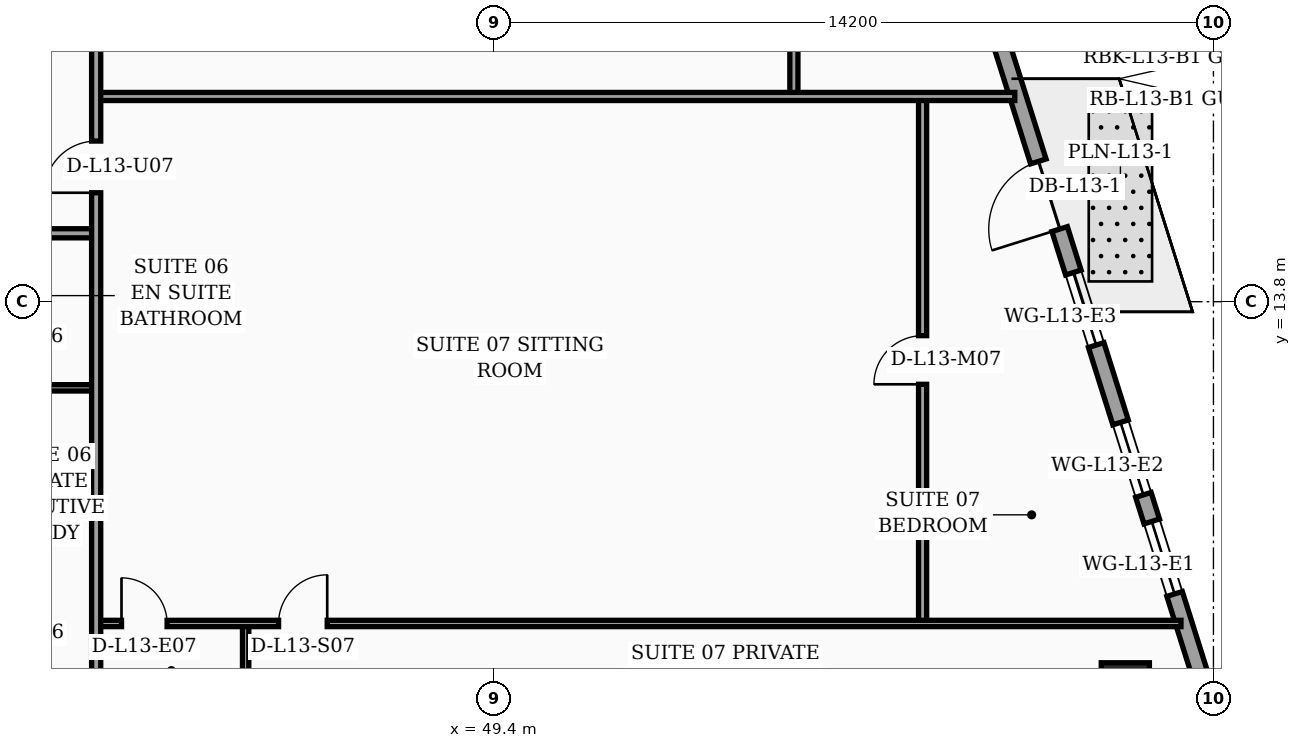
"""IFC4 building model, lengths in metres.
Left out: names, types, materials, properties, quantities, classifications, styles, units other than length and angle.
Written with IfcOpenShell. Run it as: python <this file> out.ifc"""

import sys

from ifc_helpers import new_model, si_unit, direction, frame, frame_2d, origin, origin_2d, place, context, subcontext, project, spatial, rectangle, hollow_rectangle, extrude, element, fill, save


model = new_model("IFC4")
c1 = context("Model", 3, precision=1e-05, world=origin(), true_north=direction((0.0, 1.0)))
c2 = subcontext(c1, "Body", "Model", "MODEL_VIEW")
j1 = project(units=[si_unit("LENGTHUNIT", "METRE"), si_unit("PLANEANGLEUNIT", "RADIAN")], contexts=[c1])
p1 = place(None, origin())
s1 = spatial("IfcSite", under=j1, at=p1, CompositionType="ELEMENT")
p2 = place(p1, origin())
s2 = spatial("IfcBuilding", under=s1, at=p2, CompositionType="ELEMENT")
p3 = place(p2, frame((0.0, 0.0, 58.4)))
s3 = spatial("IfcBuildingStorey", under=s2, at=p3, CompositionType="ELEMENT", Elevation=58.4)
p4 = place(p3, frame((61.861, 6.2, 0.0), z_axis=(0.0, 0.0, 1.0), x_axis=(1.0, 0.0, 0.0)))
e1 = element("IfcColumn", 1, at=p4, inside=s3, PredefinedType="COLUMN", context=c2, shape_type="SweptSolid", body=[
    extrude(hollow_rectangle(XDim=0.95, YDim=0.95, WallThickness=0.04, at=origin_2d()), origin(), (0.0, 0.0, 1.0), 3.56),
])
p5 = place(p3, frame((63.63, 5.505, 0.0), z_axis=(0.0, 0.0, 1.0), x_axis=(-0.300501856448, 0.953781229775, 0.0)))
e2 = element("IfcWall", 2, at=p5, inside=s3, PredefinedType="SOLIDWALL", context=c2, shape_type="SweptSolid", body=[
    extrude(rectangle(XDim=30.814, YDim=0.32, at=frame_2d((15.407, 0.0))), origin(), (0.0, 0.0, 1.0), 3.56),
])
p6 = place(p5, frame((10.199, 0.0, 0.0)))
e3 = element("IfcOpeningElement", 3, at=p6, cuts=e2, PredefinedType="OPENING", context=c2, shape_type="SweptSolid", body=[
    extrude(rectangle(XDim=1.4, YDim=2.25, at=frame_2d((0.7, 1.125))), frame((0.0, 0.17, 0.0), z_axis=(0.0, -1.0, 0.0), x_axis=(1.0, 0.0, 0.0)), (0.0, 0.0, 1.0), 0.34),
])
p7 = place(p5, frame((2.65, 0.0, 0.75)))
e4 = element("IfcOpeningElement", 4, at=p7, cuts=e2, PredefinedType="OPENING", context=c2, shape_type="SweptSolid", body=[
    extrude(rectangle(XDim=1.5, YDim=1.6, at=frame_2d((0.75, 0.8))), frame((0.0, 0.17, 0.0), z_axis=(0.0, -1.0, 0.0), x_axis=(1.0, 0.0, 0.0)), (0.0, 0.0, 1.0), 0.34),
])
p8 = place(p5, frame((4.7, 0.0, 0.75)))
e5 = element("IfcOpeningElement", 5, at=p8, cuts=e2, PredefinedType="OPENING", context=c2, shape_type="SweptSolid", body=[
    extrude(rectangle(XDim=1.5, YDim=1.6, at=frame_2d((0.75, 0.8))), frame((0.0, 0.17, 0.0), z_axis=(0.0, -1.0, 0.0), x_axis=(1.0, 0.0, 0.0)), (0.0, 0.0, 1.0), 0.34),
])
p9 = place(p5, frame((7.8, 0.0, 0.75)))
e6 = element("IfcOpeningElement", 6, at=p9, cuts=e2, PredefinedType="OPENING", context=c2, shape_type="SweptSolid", body=[
    extrude(rectangle(XDim=1.5, YDim=1.6, at=frame_2d((0.75, 0.8))), frame((0.0, 0.17, 0.0), z_axis=(0.0, -1.0, 0.0), x_axis=(1.0, 0.0, 0.0)), (0.0, 0.0, 1.0), 0.34),
])
p10 = place(p5, frame((14.0, 0.0, 0.75)))
e7 = element("IfcOpeningElement", 7, at=p10, cuts=e2, PredefinedType="OPENING", context=c2, shape_type="SweptSolid", body=[
    extrude(rectangle(XDim=1.5, YDim=1.6, at=frame_2d((0.75, 0.8))), frame((0.0, 0.17, 0.0), z_axis=(0.0, -1.0, 0.0), x_axis=(1.0, 0.0, 0.0)), (0.0, 0.0, 1.0), 0.34),
])
p11 = place(p5, frame((17.1, 0.0, 0.75)))
e8 = element("IfcOpeningElement", 8, at=p11, cuts=e2, PredefinedType="OPENING", context=c2, shape_type="SweptSolid", body=[
    extrude(rectangle(XDim=1.5, YDim=1.6, at=frame_2d((0.75, 0.8))), frame((0.0, 0.17, 0.0), z_axis=(0.0, -1.0, 0.0), x_axis=(1.0, 0.0, 0.0)), (0.0, 0.0, 1.0), 0.34),
])
p12 = place(p5, frame((23.3, 0.0, 0.75)))
e9 = element("IfcOpeningElement", 9, at=p12, cuts=e2, PredefinedType="OPENING", context=c2, shape_type="SweptSolid", body=[
    extrude(rectangle(XDim=1.5, YDim=1.6, at=frame_2d((0.75, 0.8))), frame((0.0, 0.17, 0.0), z_axis=(0.0, -1.0, 0.0), x_axis=(1.0, 0.0, 0.0)), (0.0, 0.0, 1.0), 0.34),
])
p13 = place(p5, frame((27.45, 0.0, 0.75)))
e10 = element("IfcOpeningElement", 10, at=p13, cuts=e2, PredefinedType="OPENING", context=c2, shape_type="SweptSolid", body=[
    extrude(rectangle(XDim=1.5, YDim=1.6, at=frame_2d((0.75, 0.8))), frame((0.0, 0.17, 0.0), z_axis=(0.0, -1.0, 0.0), x_axis=(1.0, 0.0, 0.0)), (0.0, 0.0, 1.0), 0.34),
])
p14 = place(p3, frame((39.42, 12.1, 0.0), z_axis=(0.0, 0.0, 1.0), x_axis=(1.0, 0.0, 0.0)))
e11 = element("IfcWall", 11, at=p14, inside=s3, PredefinedType="PARTITIONING", context=c2, shape_type="SweptSolid", body=[
    extrude(rectangle(XDim=2.13, YDim=0.125, at=frame_2d((1.065, 0.0))), origin(), (0.0, 0.0, 1.0), 3.56),
])
p15 = place(p3, frame((32.4, 15.15, 0.0), z_axis=(0.0, 0.0, 1.0), x_axis=(1.0, 0.0, 0.0)))
e12 = element("IfcWall", 12, at=p15, inside=s3, PredefinedType="PARTITIONING", context=c2, shape_type="SweptSolid", body=[
    extrude(rectangle(XDim=9.15, YDim=0.18, at=frame_2d((4.575, 0.0))), origin(), (0.0, 0.0, 1.0), 2.84),
])
p16 = place(p15, frame((3.1, 0.0, 0.0)))
e13 = element("IfcOpeningElement", 13, at=p16, cuts=e12, PredefinedType="OPENING", context=c2, shape_type="SweptSolid", body=[
    extrude(rectangle(XDim=1.02, YDim=2.2, at=frame_2d((0.51, 1.1))), frame((0.0, 0.1, 0.0), z_axis=(0.0, -1.0, 0.0), x_axis=(1.0, 0.0, 0.0)), (0.0, 0.0, 1.0), 0.2),
])
p17 = place(p3, frame((44.5, 5.66, 0.0), z_axis=(0.0, 0.0, 1.0), x_axis=(0.0, 1.0, 0.0)))
e14 = element("IfcWall", 14, at=p17, inside=s3, PredefinedType="PARTITIONING", context=c2, shape_type="SweptSolid", body=[
    extrude(rectangle(XDim=1.79, YDim=0.125, at=frame_2d((0.895, 0.0))), origin(), (0.0, 0.0, 1.0), 3.56),
])
p18 = place(p3, frame((57.86, 7.45, 0.0), z_axis=(0.0, 0.0, 1.0), x_axis=(0.0, 1.0, 0.0)))
e15 = element("IfcWall", 15, at=p18, inside=s3, PredefinedType="PARTITIONING", context=c2, shape_type="SweptSolid", body=[
    extrude(rectangle(XDim=10.4, YDim=0.16, at=frame_2d((5.2, 0.0))), origin(), (0.0, 0.0, 1.0), 3.04),
])
p19 = place(p18, frame((4.72, 0.0, 0.0)))
e16 = element("IfcOpeningElement", 16, at=p19, cuts=e15, PredefinedType="OPENING", context=c2, shape_type="SweptSolid", body=[
    extrude(rectangle(XDim=0.96, YDim=2.2, at=frame_2d((0.48, 1.1))), frame((0.0, 0.09, 0.0), z_axis=(0.0, -1.0, 0.0), x_axis=(1.0, 0.0, 0.0)), (0.0, 0.0, 1.0), 0.18),
])
p20 = place(p3, frame((41.55, 7.45, 0.0), z_axis=(0.0, 0.0, 1.0), x_axis=(1.0, 0.0, 0.0)))
e17 = element("IfcWall", 17, at=p20, inside=s3, PredefinedType="PARTITIONING", context=c2, shape_type="SweptSolid", body=[
    extrude(rectangle(XDim=21.41, YDim=0.125, at=frame_2d((10.705, 0.0))), origin(), (0.0, 0.0, 1.0), 2.84),
])
p21 = place(p20, frame((0.5, 0.0, 0.0)))
e18 = element("IfcOpeningElement", 18, at=p21, cuts=e17, PredefinedType="OPENING", context=c2, shape_type="SweptSolid", body=[
    extrude(rectangle(XDim=0.9, YDim=2.15, at=frame_2d((0.45, 1.075))), frame((0.0, 0.073, 0.0), z_axis=(0.0, -1.0, 0.0), x_axis=(1.0, 0.0, 0.0)), (0.0, 0.0, 1.0), 0.145),
])
p22 = place(p20, frame((3.6, 0.0, 0.0)))
e19 = element("IfcOpeningElement", 19, at=p22, cuts=e17, PredefinedType="OPENING", context=c2, shape_type="SweptSolid", body=[
    extrude(rectangle(XDim=0.96, YDim=2.2, at=frame_2d((0.48, 1.1))), frame((0.0, 0.073, 0.0), z_axis=(0.0, -1.0, 0.0), x_axis=(1.0, 0.0, 0.0)), (0.0, 0.0, 1.0), 0.145),
])
p23 = place(p3, frame((55.32, 17.85, 0.0), z_axis=(0.0, 0.0, 1.0), x_axis=(0.0, 1.0, 0.0)))
e20 = element("IfcWall", 20, at=p23, inside=s3, PredefinedType="PARTITIONING", context=c2, shape_type="SweptSolid", body=[
    extrude(rectangle(XDim=5.74, YDim=0.16, at=frame_2d((2.87, 0.0))), origin(), (0.0, 0.0, 1.0), 2.84),
])
p24 = place(p23, frame((2.39, 0.0, 0.0)))
e21 = element("IfcOpeningElement", 21, at=p24, cuts=e20, PredefinedType="OPENING", context=c2, shape_type="SweptSolid", body=[
    extrude(rectangle(XDim=0.96, YDim=2.2, at=frame_2d((0.48, 1.1))), frame((0.0, 0.09, 0.0), z_axis=(0.0, -1.0, 0.0), x_axis=(1.0, 0.0, 0.0)), (0.0, 0.0, 1.0), 0.18),
])
p25 = place(p3, frame((41.55, 17.85, 0.0), z_axis=(0.0, 0.0, 1.0), x_axis=(1.0, 0.0, 0.0)))
e22 = element("IfcWall", 22, at=p25, inside=s3, PredefinedType="PARTITIONING", context=c2, shape_type="SweptSolid", body=[
    extrude(rectangle(XDim=18.13, YDim=0.16, at=frame_2d((9.065, 0.0))), origin(), (0.0, 0.0, 1.0), 2.84),
])
p26 = place(p3, frame((41.55, 2.44, 0.0), z_axis=(0.0, 0.0, 1.0), x_axis=(0.0, 1.0, 0.0)))
e23 = element("IfcWall", 23, at=p26, inside=s3, PredefinedType="PARTITIONING", context=c2, shape_type="SweptSolid", body=[
    extrude(rectangle(XDim=31.04, YDim=0.18, at=frame_2d((15.52, 0.0))), origin(), (0.0, 0.0, 1.0), 2.84),
])
p27 = place(p26, frame((13.51, 0.0, 0.0)))
e24 = element("IfcOpeningElement", 24, at=p27, cuts=e23, PredefinedType="OPENING", context=c2, shape_type="SweptSolid", body=[
    extrude(rectangle(XDim=1.02, YDim=2.2, at=frame_2d((0.51, 1.1))), frame((0.0, 0.1, 0.0), z_axis=(0.0, -1.0, 0.0), x_axis=(1.0, 0.0, 0.0)), (0.0, 0.0, 1.0), 0.2),
])
p28 = place(p26, frame((17.77, 0.0, 0.0)))
e25 = element("IfcOpeningElement", 25, at=p28, cuts=e23, PredefinedType="OPENING", context=c2, shape_type="SweptSolid", body=[
    extrude(rectangle(XDim=1.02, YDim=2.2, at=frame_2d((0.51, 1.1))), frame((0.0, 0.1, 0.0), z_axis=(0.0, -1.0, 0.0), x_axis=(1.0, 0.0, 0.0)), (0.0, 0.0, 1.0), 0.2),
])
p29 = place(p26, frame((25.58, 0.0, 0.0)))
e26 = element("IfcOpeningElement", 26, at=p29, cuts=e23, PredefinedType="OPENING", context=c2, shape_type="SweptSolid", body=[
    extrude(rectangle(XDim=1.02, YDim=2.2, at=frame_2d((0.51, 1.1))), frame((0.0, 0.1, 0.0), z_axis=(0.0, -1.0, 0.0), x_axis=(1.0, 0.0, 0.0)), (0.0, 0.0, 1.0), 0.2),
])
p30 = place(p6, origin())
e27 = element("IfcDoor", 27, at=p30, inside=s3, OperationType="SINGLE_SWING_LEFT", PredefinedType="DOOR", context=c2, shape_type="SweptSolid", body=[
    extrude(rectangle(XDim=1.4, YDim=2.25, at=frame_2d((0.7, 1.125))), frame((0.0, 0.025, 0.0), z_axis=(0.0, -1.0, 0.0), x_axis=(1.0, 0.0, 0.0)), (0.0, 0.0, 1.0), 0.05),
])
fill(e3, e27)
p31 = place(p7, origin())
e28 = element("IfcWindow", 28, at=p31, inside=s3, PartitioningType="SINGLE_PANEL", PredefinedType="WINDOW", context=c2, shape_type="SweptSolid", body=[
    extrude(rectangle(XDim=1.5, YDim=1.6, at=frame_2d((0.75, 0.8))), frame((0.0, 0.03, 0.0), z_axis=(0.0, -1.0, 0.0), x_axis=(1.0, 0.0, 0.0)), (0.0, 0.0, 1.0), 0.06),
])
fill(e4, e28)
p32 = place(p8, origin())
e29 = element("IfcWindow", 29, at=p32, inside=s3, PartitioningType="SINGLE_PANEL", PredefinedType="WINDOW", context=c2, shape_type="SweptSolid", body=[
    extrude(rectangle(XDim=1.5, YDim=1.6, at=frame_2d((0.75, 0.8))), frame((0.0, 0.03, 0.0), z_axis=(0.0, -1.0, 0.0), x_axis=(1.0, 0.0, 0.0)), (0.0, 0.0, 1.0), 0.06),
])
fill(e5, e29)
p33 = place(p9, origin())
e30 = element("IfcWindow", 30, at=p33, inside=s3, PartitioningType="SINGLE_PANEL", PredefinedType="WINDOW", context=c2, shape_type="SweptSolid", body=[
    extrude(rectangle(XDim=1.5, YDim=1.6, at=frame_2d((0.75, 0.8))), frame((0.0, 0.03, 0.0), z_axis=(0.0, -1.0, 0.0), x_axis=(1.0, 0.0, 0.0)), (0.0, 0.0, 1.0), 0.06),
])
fill(e6, e30)
p34 = place(p19, origin())
e31 = element("IfcDoor", 31, at=p34, inside=s3, OperationType="SINGLE_SWING_LEFT", PredefinedType="DOOR", context=c2, shape_type="SweptSolid", body=[
    extrude(rectangle(XDim=0.96, YDim=2.2, at=frame_2d((0.48, 1.1))), frame((0.0, 0.025, 0.0), z_axis=(0.0, -1.0, 0.0), x_axis=(1.0, 0.0, 0.0)), (0.0, 0.0, 1.0), 0.05),
])
fill(e16, e31)
p35 = place(p21, origin())
e32 = element("IfcDoor", 32, at=p35, inside=s3, OperationType="SINGLE_SWING_LEFT", PredefinedType="DOOR", context=c2, shape_type="SweptSolid", body=[
    extrude(rectangle(XDim=0.9, YDim=2.15, at=frame_2d((0.45, 1.075))), frame((0.0, 0.025, 0.0), z_axis=(0.0, -1.0, 0.0), x_axis=(1.0, 0.0, 0.0)), (0.0, 0.0, 1.0), 0.05),
])
fill(e18, e32)
p36 = place(p22, origin())
e33 = element("IfcDoor", 33, at=p36, inside=s3, OperationType="SINGLE_SWING_RIGHT", PredefinedType="DOOR", context=c2, shape_type="SweptSolid", body=[
    extrude(rectangle(XDim=0.96, YDim=2.2, at=frame_2d((0.48, 1.1))), frame((0.0, 0.025, 0.0), z_axis=(0.0, -1.0, 0.0), x_axis=(1.0, 0.0, 0.0)), (0.0, 0.0, 1.0), 0.05),
])
fill(e19, e33)
p37 = place(p27, origin())
e34 = element("IfcDoor", 34, at=p37, inside=s3, OperationType="SINGLE_SWING_LEFT", PredefinedType="DOOR", context=c2, shape_type="SweptSolid", body=[
    extrude(rectangle(XDim=1.02, YDim=2.2, at=frame_2d((0.51, 1.1))), frame((0.0, 0.025, 0.0), z_axis=(0.0, -1.0, 0.0), x_axis=(1.0, 0.0, 0.0)), (0.0, 0.0, 1.0), 0.05),
])
fill(e24, e34)
save(model, sys.argv[1])
